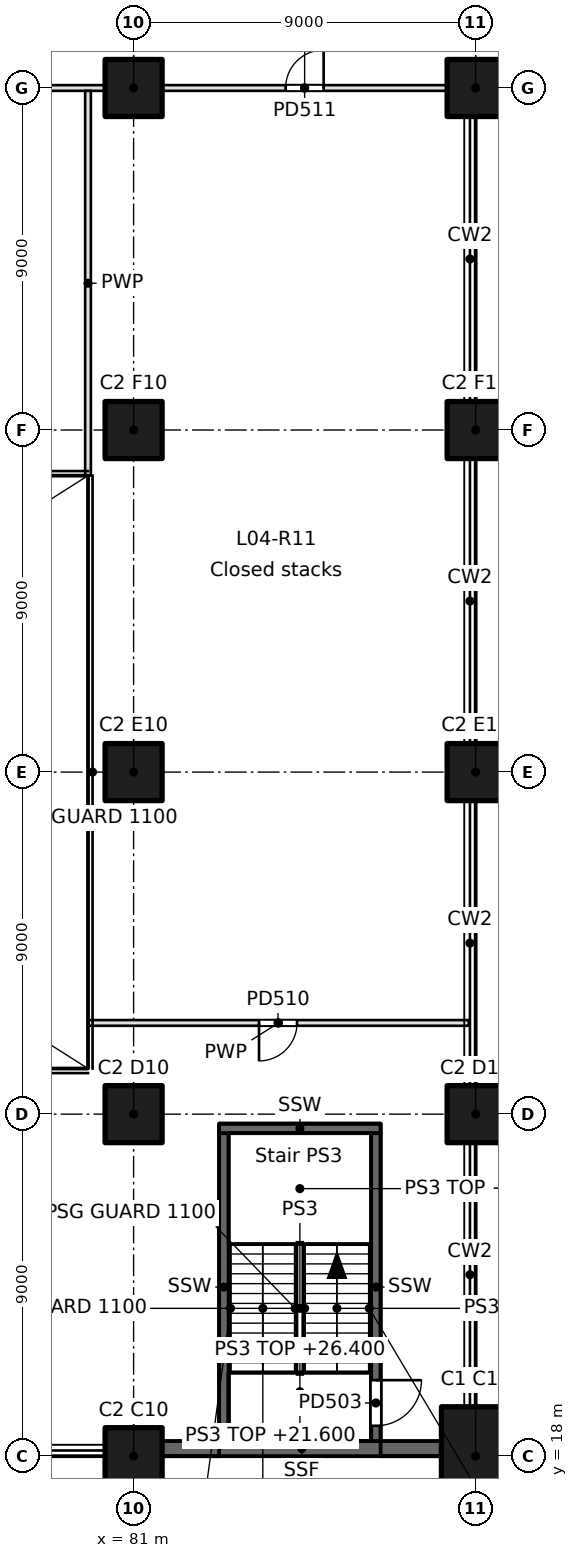
"""IFC4 building model, lengths in metres.
Left out: names, types, materials, properties, quantities, classifications, styles, units other than length and angle.
Written with IfcOpenShell. Run it as: python <this file> out.ifc"""

import sys

from ifc_helpers import new_model, si_unit, direction, frame, frame_2d, origin, origin_2d, place, context, subcontext, project, spatial, rectangle, extrude, element, fill, save


model = new_model("IFC4")
c1 = context("Model", 3, precision=1e-05, world=origin(), true_north=direction((0.0, 1.0)))
c2 = subcontext(c1, "Body", "Model", "MODEL_VIEW")
j1 = project(units=[si_unit("LENGTHUNIT", "METRE"), si_unit("PLANEANGLEUNIT", "RADIAN")], contexts=[c1])
p1 = place(None, origin())
s1 = spatial("IfcSite", under=j1, at=p1, CompositionType="ELEMENT")
p2 = place(p1, origin())
s2 = spatial("IfcBuilding", under=s1, at=p2, CompositionType="ELEMENT")
p3 = place(p2, frame((0.0, 0.0, 21.6)))
s3 = spatial("IfcBuildingStorey", under=s2, at=p3, CompositionType="ELEMENT", Elevation=21.6)
for number, where, z_axis, x_axis in (
    (1, (81.0, 54.0, 0.0), (0.0, 0.0, 1.0), (1.0, 0.0, 0.0)),
    (2, (90.0, 54.0, 0.0), (0.0, 0.0, 1.0), (1.0, 0.0, 0.0)),
    (3, (81.0, 18.0, 0.0), (0.0, 0.0, 1.0), (1.0, 0.0, 0.0)),
):
    element("IfcColumn", number, at=place(p3, frame(where, z_axis=z_axis, x_axis=x_axis)), inside=s3, PredefinedType="COLUMN", context=c2, shape_type="SweptSolid", body=[
        extrude(rectangle(XDim=1.5, YDim=1.5, at=origin_2d()), origin(), (0.0, 0.0, 1.0), 4.8),
    ])
p4 = place(p3, frame((90.0, 18.0, 0.0), z_axis=(0.0, 0.0, 1.0), x_axis=(0.0, 1.0, 0.0)))
e4 = element("IfcColumn", 4, at=p4, inside=s3, PredefinedType="COLUMN", context=c2, shape_type="SweptSolid", body=[
    extrude(rectangle(XDim=2.6, YDim=1.8, at=origin_2d()), origin(), (0.0, 0.0, 1.0), 4.8),
])
for number, where, z_axis, x_axis in (
    (5, (90.0, 27.0, 0.0), (0.0, 0.0, 1.0), (1.0, 0.0, 0.0)),
    (6, (90.0, 36.0, 0.0), (0.0, 0.0, 1.0), (1.0, 0.0, 0.0)),
    (7, (90.0, 45.0, 0.0), (0.0, 0.0, 1.0), (1.0, 0.0, 0.0)),
    (8, (81.0, 27.0, 0.0), (0.0, 0.0, 1.0), (1.0, 0.0, 0.0)),
    (9, (81.0, 36.0, 0.0), (0.0, 0.0, 1.0), (1.0, 0.0, 0.0)),
    (10, (81.0, 45.0, 0.0), (0.0, 0.0, 1.0), (1.0, 0.0, 0.0)),
):
    element("IfcColumn", number, at=place(p3, frame(where, z_axis=z_axis, x_axis=x_axis)), inside=s3, PredefinedType="COLUMN", context=c2, shape_type="SweptSolid", body=[
        extrude(rectangle(XDim=1.5, YDim=1.5, at=origin_2d()), origin(), (0.0, 0.0, 1.0), 4.8),
    ])
p5 = place(p3, frame((83.375, 18.4, 0.0), z_axis=(0.0, 0.0, 1.0), x_axis=(0.0, 1.0, 0.0)))
e11 = element("IfcWall", 11, at=p5, inside=s3, PredefinedType="SOLIDWALL", context=c2, shape_type="SweptSolid", body=[
    extrude(rectangle(XDim=8.1, YDim=0.25, at=frame_2d((4.05, 0.0))), origin(), (0.0, 0.0, 1.0), 4.8),
])
p6 = place(p3, frame((87.375, 26.5, 0.0), z_axis=(0.0, 0.0, 1.0), x_axis=(0.0, -1.0, 0.0)))
e12 = element("IfcWall", 12, at=p6, inside=s3, PredefinedType="SOLIDWALL", context=c2, shape_type="SweptSolid", body=[
    extrude(rectangle(XDim=8.1, YDim=0.25, at=frame_2d((4.05, 0.0))), origin(), (0.0, 0.0, 1.0), 4.8),
])
p7 = place(p6, frame((6.5, 0.0, 0.0)))
e13 = element("IfcOpeningElement", 13, at=p7, cuts=e12, PredefinedType="OPENING", context=c2, shape_type="SweptSolid", body=[
    extrude(rectangle(XDim=1.2, YDim=2.1, at=frame_2d((0.6, 1.05))), frame((0.0, 0.125, 0.0), z_axis=(0.0, -1.0, 0.0), x_axis=(1.0, 0.0, 0.0)), (0.0, 0.0, 1.0), 0.25),
])
p8 = place(p3, frame((83.25, 26.625, 0.0), z_axis=(0.0, 0.0, 1.0), x_axis=(1.0, 0.0, 0.0)))
e14 = element("IfcWall", 14, at=p8, inside=s3, PredefinedType="SOLIDWALL", context=c2, shape_type="SweptSolid", body=[
    extrude(rectangle(XDim=4.25, YDim=0.25, at=frame_2d((2.125, 0.0))), origin(), (0.0, 0.0, 1.0), 4.8),
])
p9 = place(p3, frame((89.1, 18.2, 0.0), z_axis=(0.0, 0.0, 1.0), x_axis=(-1.0, 0.0, 0.0)))
e15 = element("IfcWall", 15, at=p9, inside=s3, PredefinedType="SOLIDWALL", context=c2, shape_type="SweptSolid", body=[
    extrude(rectangle(XDim=7.35, YDim=0.4, at=frame_2d((3.675, 0.0))), origin(), (0.0, 0.0, 1.0), 4.45),
])
p10 = place(p3, frame((89.82, 29.4, 0.0), z_axis=(0.0, 0.0, 1.0), x_axis=(-1.0, 0.0, 0.0)))
e16 = element("IfcWall", 16, at=p10, inside=s3, PredefinedType="PARTITIONING", context=c2, shape_type="SweptSolid", body=[
    extrude(rectangle(XDim=10.02, YDim=0.15, at=frame_2d((5.01, 0.0))), origin(), (0.0, 0.0, 1.0), 4.45),
])
p11 = place(p10, frame((4.52, 0.0, 0.0)))
e17 = element("IfcOpeningElement", 17, at=p11, cuts=e16, PredefinedType="OPENING", context=c2, shape_type="SweptSolid", body=[
    extrude(rectangle(XDim=1.0, YDim=2.1, at=frame_2d((0.5, 1.05))), frame((0.0, 0.075, 0.0), z_axis=(0.0, -1.0, 0.0), x_axis=(1.0, 0.0, 0.0)), (0.0, 0.0, 1.0), 0.15),
])
p12 = place(p3, frame((72.75, 54.0, 0.0), z_axis=(0.0, 0.0, 1.0), x_axis=(1.0, 0.0, 0.0)))
e18 = element("IfcWall", 18, at=p12, inside=s3, PredefinedType="PARTITIONING", context=c2, shape_type="SweptSolid", body=[
    extrude(rectangle(XDim=7.5, YDim=0.15, at=frame_2d((3.75, 0.0))), origin(), (0.0, 0.0, 1.0), 4.45),
])
p13 = place(p12, frame((3.0, 0.0, 0.0)))
e19 = element("IfcOpeningElement", 19, at=p13, cuts=e18, PredefinedType="OPENING", context=c2, shape_type="SweptSolid", body=[
    extrude(rectangle(XDim=1.0, YDim=2.1, at=frame_2d((0.5, 1.05))), frame((0.0, 0.075, 0.0), z_axis=(0.0, -1.0, 0.0), x_axis=(1.0, 0.0, 0.0)), (0.0, 0.0, 1.0), 0.15),
])
p14 = place(p3, frame((81.75, 54.0, 0.0), z_axis=(0.0, 0.0, 1.0), x_axis=(1.0, 0.0, 0.0)))
e20 = element("IfcWall", 20, at=p14, inside=s3, PredefinedType="PARTITIONING", context=c2, shape_type="SweptSolid", body=[
    extrude(rectangle(XDim=7.5, YDim=0.15, at=frame_2d((3.75, 0.0))), origin(), (0.0, 0.0, 1.0), 4.45),
])
p15 = place(p14, frame((3.25, 0.0, 0.0)))
e21 = element("IfcOpeningElement", 21, at=p15, cuts=e20, PredefinedType="OPENING", context=c2, shape_type="SweptSolid", body=[
    extrude(rectangle(XDim=1.0, YDim=2.1, at=frame_2d((0.5, 1.05))), frame((0.0, 0.075, 0.0), z_axis=(0.0, -1.0, 0.0), x_axis=(1.0, 0.0, 0.0)), (0.0, 0.0, 1.0), 0.15),
])
p16 = place(p3, frame((79.8, 43.8, 0.0), z_axis=(0.0, 0.0, 1.0), x_axis=(0.0, 1.0, 0.0)))
e22 = element("IfcWall", 22, at=p16, inside=s3, PredefinedType="PARTITIONING", context=c2, shape_type="SweptSolid", body=[
    extrude(rectangle(XDim=10.125, YDim=0.15, at=frame_2d((5.062, 0.0))), origin(), (0.0, 0.0, 1.0), 4.45),
])
p17 = place(p7, origin())
e23 = element("IfcDoor", 23, at=p17, inside=s3, OperationType="SINGLE_SWING_LEFT", PredefinedType="DOOR", context=c2, shape_type="SweptSolid", body=[
    extrude(rectangle(XDim=1.2, YDim=2.1, at=frame_2d((0.6, 1.05))), frame((0.0, 0.025, 0.0), z_axis=(0.0, -1.0, 0.0), x_axis=(1.0, 0.0, 0.0)), (0.0, 0.0, 1.0), 0.05),
])
fill(e13, e23)
p18 = place(p11, origin())
e24 = element("IfcDoor", 24, at=p18, inside=s3, OperationType="SINGLE_SWING_RIGHT", PredefinedType="DOOR", context=c2, shape_type="SweptSolid", body=[
    extrude(rectangle(XDim=1.0, YDim=2.1, at=frame_2d((0.5, 1.05))), frame((0.0, 0.025, 0.0), z_axis=(0.0, -1.0, 0.0), x_axis=(1.0, 0.0, 0.0)), (0.0, 0.0, 1.0), 0.05),
])
fill(e17, e24)
p19 = place(p15, origin())
e25 = element("IfcDoor", 25, at=p19, inside=s3, OperationType="SINGLE_SWING_RIGHT", PredefinedType="DOOR", context=c2, shape_type="SweptSolid", body=[
    extrude(rectangle(XDim=1.0, YDim=2.1, at=frame_2d((0.5, 1.05))), frame((0.0, 0.025, 0.0), z_axis=(0.0, -1.0, 0.0), x_axis=(1.0, 0.0, 0.0)), (0.0, 0.0, 1.0), 0.05),
])
fill(e21, e25)
save(model, sys.argv[1])
